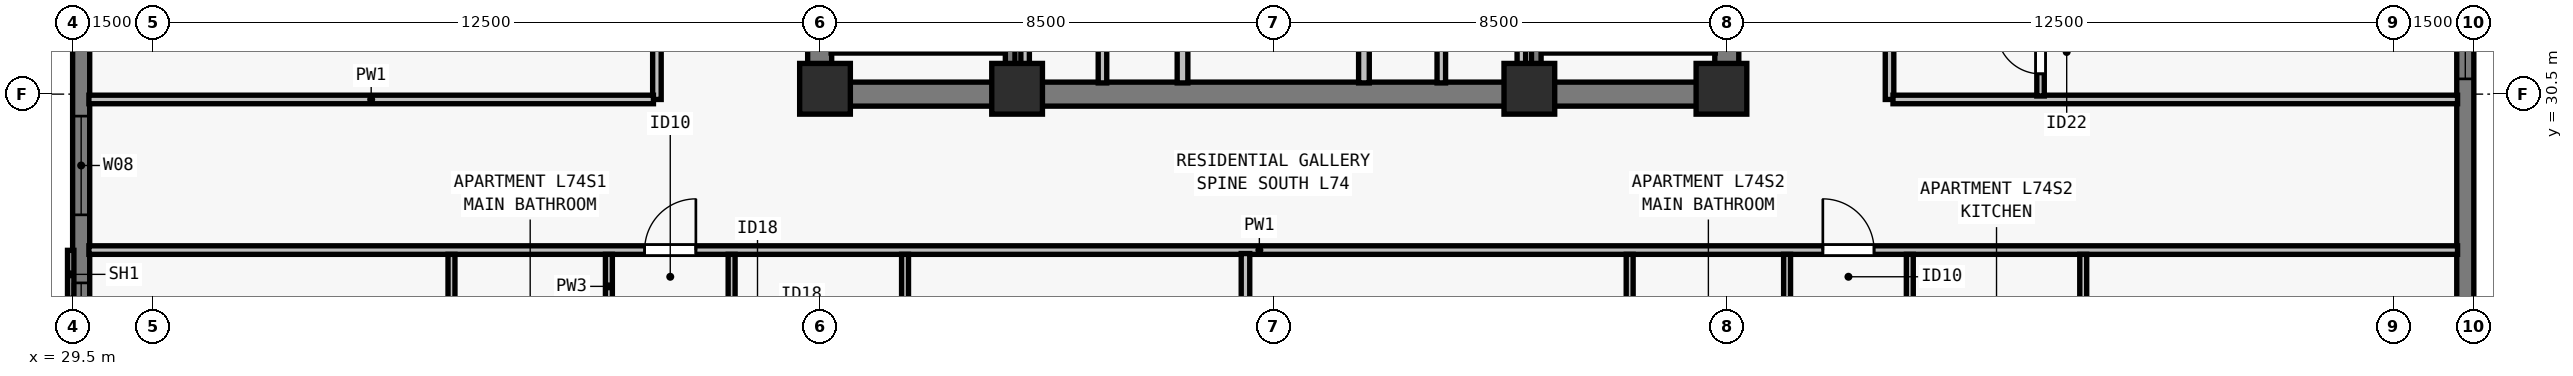
"""IFC4 building model, lengths in metres.
Left out: names, types, materials, properties, quantities, classifications, styles, units other than length and angle.
Written with IfcOpenShell. Run it as: python <this file> out.ifc"""

import sys

from ifc_helpers import new_model, si_unit, direction, frame, frame_2d, origin, origin_2d, place, context, subcontext, project, spatial, rectangle, extrude, element, fill, save


model = new_model("IFC4")
c1 = context("Model", 3, precision=1e-05, world=origin(), true_north=direction((0.0, 1.0)))
c2 = subcontext(c1, "Body", "Model", "MODEL_VIEW")
j1 = project(units=[si_unit("LENGTHUNIT", "METRE"), si_unit("PLANEANGLEUNIT", "RADIAN")], contexts=[c1])
p1 = place(None, origin())
s1 = spatial("IfcSite", under=j1, at=p1, CompositionType="ELEMENT")
p2 = place(p1, origin())
s2 = spatial("IfcBuilding", under=s1, at=p2, CompositionType="ELEMENT")
p3 = place(p2, frame((0.0, 0.0, 269.0)))
s3 = spatial("IfcBuildingStorey", under=s2, at=p3, CompositionType="ELEMENT", Elevation=269.0)
for number, where, z_axis, x_axis in (
    (1, (43.6, 30.6, 0.0), (0.0, 0.0, 1.0), (1.0, 0.0, 0.0)),
    (2, (47.2, 30.6, 0.0), (0.0, 0.0, 1.0), (1.0, 0.0, 0.0)),
    (3, (56.8, 30.6, 0.0), (0.0, 0.0, 1.0), (1.0, 0.0, 0.0)),
    (4, (60.4, 30.6, 0.0), (0.0, 0.0, 1.0), (1.0, 0.0, 0.0)),
):
    element("IfcColumn", number, at=place(p3, frame(where, z_axis=z_axis, x_axis=x_axis)), inside=s3, PredefinedType="COLUMN", context=c2, shape_type="SweptSolid", body=[
        extrude(rectangle(XDim=0.95, YDim=0.95, at=origin_2d()), origin(), (0.0, 0.0, 1.0), 3.5),
    ])
p4 = place(p3, frame((29.66, 21.5, 0.0), z_axis=(0.0, 0.0, 1.0), x_axis=(0.0, 1.0, 0.0)))
e5 = element("IfcWall", 5, at=p4, inside=s3, PredefinedType="SOLIDWALL", context=c2, shape_type="SweptSolid", body=[
    extrude(rectangle(XDim=34.702, YDim=0.32, at=frame_2d((17.351, 0.0))), origin(), (0.0, 0.0, 1.0), 3.29),
])
p5 = place(p4, frame((3.913, 0.0, 0.8)))
e6 = element("IfcOpeningElement", 6, at=p5, cuts=e5, PredefinedType="OPENING", context=c2, shape_type="SweptSolid", body=[
    extrude(rectangle(XDim=1.55, YDim=1.678, at=frame_2d((0.775, 0.839))), frame((0.0, 0.17, 0.0), z_axis=(0.0, -1.0, 0.0), x_axis=(1.0, 0.0, 0.0)), (0.0, 0.0, 1.0), 0.34),
])
p6 = place(p4, frame((6.738, 0.0, 0.8)))
e7 = element("IfcOpeningElement", 7, at=p6, cuts=e5, PredefinedType="OPENING", context=c2, shape_type="SweptSolid", body=[
    extrude(rectangle(XDim=1.85, YDim=1.678, at=frame_2d((0.925, 0.839))), frame((0.0, 0.17, 0.0), z_axis=(0.0, -1.0, 0.0), x_axis=(1.0, 0.0, 0.0)), (0.0, 0.0, 1.0), 0.34),
])
p7 = place(p4, frame((10.263, 0.0, 0.8)))
e8 = element("IfcOpeningElement", 8, at=p7, cuts=e5, PredefinedType="OPENING", context=c2, shape_type="SweptSolid", body=[
    extrude(rectangle(XDim=1.55, YDim=1.678, at=frame_2d((0.775, 0.839))), frame((0.0, 0.17, 0.0), z_axis=(0.0, -1.0, 0.0), x_axis=(1.0, 0.0, 0.0)), (0.0, 0.0, 1.0), 0.34),
])
p8 = place(p4, frame((14.738, 0.0, 0.8)))
e9 = element("IfcOpeningElement", 9, at=p8, cuts=e5, PredefinedType="OPENING", context=c2, shape_type="SweptSolid", body=[
    extrude(rectangle(XDim=1.85, YDim=1.678, at=frame_2d((0.925, 0.839))), frame((0.0, 0.17, 0.0), z_axis=(0.0, -1.0, 0.0), x_axis=(1.0, 0.0, 0.0)), (0.0, 0.0, 1.0), 0.34),
])
p9 = place(p4, frame((18.264, 0.0, 0.8)))
e10 = element("IfcOpeningElement", 10, at=p9, cuts=e5, PredefinedType="OPENING", context=c2, shape_type="SweptSolid", body=[
    extrude(rectangle(XDim=1.55, YDim=1.678, at=frame_2d((0.775, 0.839))), frame((0.0, 0.17, 0.0), z_axis=(0.0, -1.0, 0.0), x_axis=(1.0, 0.0, 0.0)), (0.0, 0.0, 1.0), 0.34),
])
p10 = place(p4, frame((24.164, 0.0, 0.8)))
e11 = element("IfcOpeningElement", 11, at=p10, cuts=e5, PredefinedType="OPENING", context=c2, shape_type="SweptSolid", body=[
    extrude(rectangle(XDim=1.55, YDim=1.678, at=frame_2d((0.775, 0.839))), frame((0.0, 0.17, 0.0), z_axis=(0.0, -1.0, 0.0), x_axis=(1.0, 0.0, 0.0)), (0.0, 0.0, 1.0), 0.34),
])
p11 = place(p3, frame((74.34, 56.5, 0.0), z_axis=(0.0, 0.0, 1.0), x_axis=(0.0, -1.0, 0.0)))
e12 = element("IfcWall", 12, at=p11, inside=s3, PredefinedType="SOLIDWALL", context=c2, shape_type="SweptSolid", body=[
    extrude(rectangle(XDim=34.702, YDim=0.32, at=frame_2d((17.351, 0.0))), origin(), (0.0, 0.0, 1.0), 3.29),
])
p12 = place(p11, frame((6.738, 0.0, 0.8)))
e13 = element("IfcOpeningElement", 13, at=p12, cuts=e12, PredefinedType="OPENING", context=c2, shape_type="SweptSolid", body=[
    extrude(rectangle(XDim=1.85, YDim=1.678, at=frame_2d((0.925, 0.839))), frame((0.0, 0.17, 0.0), z_axis=(0.0, -1.0, 0.0), x_axis=(1.0, 0.0, 0.0)), (0.0, 0.0, 1.0), 0.34),
])
p13 = place(p11, frame((10.263, 0.0, 0.8)))
e14 = element("IfcOpeningElement", 14, at=p13, cuts=e12, PredefinedType="OPENING", context=c2, shape_type="SweptSolid", body=[
    extrude(rectangle(XDim=1.55, YDim=1.678, at=frame_2d((0.775, 0.839))), frame((0.0, 0.17, 0.0), z_axis=(0.0, -1.0, 0.0), x_axis=(1.0, 0.0, 0.0)), (0.0, 0.0, 1.0), 0.34),
])
p14 = place(p11, frame((13.488, 0.0, 0.8)))
e15 = element("IfcOpeningElement", 15, at=p14, cuts=e12, PredefinedType="OPENING", context=c2, shape_type="SweptSolid", body=[
    extrude(rectangle(XDim=1.85, YDim=1.678, at=frame_2d((0.925, 0.839))), frame((0.0, 0.17, 0.0), z_axis=(0.0, -1.0, 0.0), x_axis=(1.0, 0.0, 0.0)), (0.0, 0.0, 1.0), 0.34),
])
p15 = place(p11, frame((18.264, 0.0, 0.8)))
e16 = element("IfcOpeningElement", 16, at=p15, cuts=e12, PredefinedType="OPENING", context=c2, shape_type="SweptSolid", body=[
    extrude(rectangle(XDim=1.55, YDim=1.678, at=frame_2d((0.775, 0.839))), frame((0.0, 0.17, 0.0), z_axis=(0.0, -1.0, 0.0), x_axis=(1.0, 0.0, 0.0)), (0.0, 0.0, 1.0), 0.34),
])
p16 = place(p11, frame((24.164, 0.0, 0.8)))
e17 = element("IfcOpeningElement", 17, at=p16, cuts=e12, PredefinedType="OPENING", context=c2, shape_type="SweptSolid", body=[
    extrude(rectangle(XDim=1.55, YDim=1.678, at=frame_2d((0.775, 0.839))), frame((0.0, 0.17, 0.0), z_axis=(0.0, -1.0, 0.0), x_axis=(1.0, 0.0, 0.0)), (0.0, 0.0, 1.0), 0.34),
])
p17 = place(p3, frame((43.275, 30.5, 0.0), z_axis=(0.0, 0.0, 1.0), x_axis=(1.0, 0.0, 0.0)))
e18 = element("IfcWall", 18, at=p17, inside=s3, PredefinedType="SHEAR", context=c2, shape_type="SweptSolid", body=[
    extrude(rectangle(XDim=17.45, YDim=0.45, at=frame_2d((8.725, 0.0))), origin(), (0.0, 0.0, 1.0), 3.29),
])
for number, where, z_axis, x_axis in (
    (19, (43.5, 30.715, 0.0), (0.0, 0.0, 1.0), (0.0, 1.0, 0.0)),
    (20, (60.5, 30.715, 0.0), (0.0, 0.0, 1.0), (0.0, 1.0, 0.0)),
):
    element("IfcWall", number, at=place(p3, frame(where, z_axis=z_axis, x_axis=x_axis)), inside=s3, PredefinedType="SHEAR", context=c2, shape_type="SweptSolid", body=[
        extrude(rectangle(XDim=8.035, YDim=0.45, at=frame_2d((4.018, 0.0))), origin(), (0.0, 0.0, 1.0), 3.29),
    ])
p18 = place(p3, frame((50.3, 30.71, 0.0), z_axis=(0.0, 0.0, 1.0), x_axis=(0.0, 1.0, 0.0)))
e21 = element("IfcWall", 21, at=p18, inside=s3, PredefinedType="SOLIDWALL", context=c2, shape_type="SweptSolid", body=[
    extrude(rectangle(XDim=7.905, YDim=0.2, at=frame_2d((3.953, 0.0))), origin(), (0.0, 0.0, 1.0), 3.29),
])
p19 = place(p18, frame((2.14, 0.0, 0.0)))
e22 = element("IfcOpeningElement", 22, at=p19, cuts=e21, PredefinedType="OPENING", context=c2, shape_type="SweptSolid", body=[
    extrude(rectangle(XDim=0.95, YDim=2.12, at=frame_2d((0.475, 1.06))), frame((0.0, 0.11, 0.0), z_axis=(0.0, -1.0, 0.0), x_axis=(1.0, 0.0, 0.0)), (0.0, 0.0, 1.0), 0.22),
])
p20 = place(p3, frame((53.7, 30.71, 0.0), z_axis=(0.0, 0.0, 1.0), x_axis=(0.0, 1.0, 0.0)))
e23 = element("IfcWall", 23, at=p20, inside=s3, PredefinedType="SOLIDWALL", context=c2, shape_type="SweptSolid", body=[
    extrude(rectangle(XDim=7.905, YDim=0.2, at=frame_2d((3.953, 0.0))), origin(), (0.0, 0.0, 1.0), 3.29),
])
p21 = place(p20, frame((2.14, 0.0, 0.0)))
e24 = element("IfcOpeningElement", 24, at=p21, cuts=e23, PredefinedType="OPENING", context=c2, shape_type="SweptSolid", body=[
    extrude(rectangle(XDim=0.95, YDim=2.12, at=frame_2d((0.475, 1.06))), frame((0.0, 0.11, 0.0), z_axis=(0.0, -1.0, 0.0), x_axis=(1.0, 0.0, 0.0)), (0.0, 0.0, 1.0), 0.22),
])
p22 = place(p3, frame((47.35, 30.71, 0.0), z_axis=(0.0, 0.0, 1.0), x_axis=(0.0, 1.0, 0.0)))
e25 = element("IfcWall", 25, at=p22, inside=s3, PredefinedType="PARTITIONING", context=c2, shape_type="SweptSolid", body=[
    extrude(rectangle(XDim=7.905, YDim=0.16, at=frame_2d((3.953, 0.0))), origin(), (0.0, 0.0, 1.0), 3.29),
])
p23 = place(p3, frame((48.8, 30.71, 0.0), z_axis=(0.0, 0.0, 1.0), x_axis=(0.0, 1.0, 0.0)))
e26 = element("IfcWall", 26, at=p23, inside=s3, PredefinedType="PARTITIONING", context=c2, shape_type="SweptSolid", body=[
    extrude(rectangle(XDim=7.905, YDim=0.16, at=frame_2d((3.953, 0.0))), origin(), (0.0, 0.0, 1.0), 3.29),
])
p24 = place(p23, frame((3.54, 0.0, 0.0)))
e27 = element("IfcOpeningElement", 27, at=p24, cuts=e26, PredefinedType="OPENING", context=c2, shape_type="SweptSolid", body=[
    extrude(rectangle(XDim=0.85, YDim=2.12, at=frame_2d((0.425, 1.06))), frame((0.0, 0.09, 0.0), z_axis=(0.0, -1.0, 0.0), x_axis=(1.0, 0.0, 0.0)), (0.0, 0.0, 1.0), 0.18),
])
p25 = place(p3, frame((56.65, 30.71, 0.0), z_axis=(0.0, 0.0, 1.0), x_axis=(0.0, 1.0, 0.0)))
e28 = element("IfcWall", 28, at=p25, inside=s3, PredefinedType="PARTITIONING", context=c2, shape_type="SweptSolid", body=[
    extrude(rectangle(XDim=7.905, YDim=0.16, at=frame_2d((3.953, 0.0))), origin(), (0.0, 0.0, 1.0), 3.29),
])
p26 = place(p3, frame((55.15, 30.71, 0.0), z_axis=(0.0, 0.0, 1.0), x_axis=(0.0, 1.0, 0.0)))
e29 = element("IfcWall", 29, at=p26, inside=s3, PredefinedType="PARTITIONING", context=c2, shape_type="SweptSolid", body=[
    extrude(rectangle(XDim=7.905, YDim=0.16, at=frame_2d((3.953, 0.0))), origin(), (0.0, 0.0, 1.0), 3.29),
])
p27 = place(p26, frame((3.54, 0.0, 0.0)))
e30 = element("IfcOpeningElement", 30, at=p27, cuts=e29, PredefinedType="OPENING", context=c2, shape_type="SweptSolid", body=[
    extrude(rectangle(XDim=0.85, YDim=2.12, at=frame_2d((0.425, 1.06))), frame((0.0, 0.09, 0.0), z_axis=(0.0, -1.0, 0.0), x_axis=(1.0, 0.0, 0.0)), (0.0, 0.0, 1.0), 0.18),
])
p28 = place(p3, frame((29.805, 27.577, 0.0), z_axis=(0.0, 0.0, 1.0), x_axis=(1.0, 0.0, 0.0)))
e31 = element("IfcWall", 31, at=p28, inside=s3, PredefinedType="PARTITIONING", context=c2, shape_type="SweptSolid", body=[
    extrude(rectangle(XDim=44.39, YDim=0.16, at=frame_2d((22.195, 0.0))), origin(), (0.0, 0.0, 1.0), 2.958),
])
p29 = place(p28, frame((10.415, 0.0, 0.0)))
e32 = element("IfcOpeningElement", 32, at=p29, cuts=e31, PredefinedType="OPENING", context=c2, shape_type="SweptSolid", body=[
    extrude(rectangle(XDim=0.96, YDim=2.18, at=frame_2d((0.48, 1.09))), frame((0.0, 0.09, 0.0), z_axis=(0.0, -1.0, 0.0), x_axis=(1.0, 0.0, 0.0)), (0.0, 0.0, 1.0), 0.18),
])
p30 = place(p28, frame((32.495, 0.0, 0.0)))
e33 = element("IfcOpeningElement", 33, at=p30, cuts=e31, PredefinedType="OPENING", context=c2, shape_type="SweptSolid", body=[
    extrude(rectangle(XDim=0.96, YDim=2.18, at=frame_2d((0.48, 1.09))), frame((0.0, 0.09, 0.0), z_axis=(0.0, -1.0, 0.0), x_axis=(1.0, 0.0, 0.0)), (0.0, 0.0, 1.0), 0.18),
])
p31 = place(p3, frame((40.45, 30.4, 0.0), z_axis=(0.0, 0.0, 1.0), x_axis=(0.0, 1.0, 0.0)))
e34 = element("IfcWall", 34, at=p31, inside=s3, PredefinedType="PARTITIONING", context=c2, shape_type="SweptSolid", body=[
    extrude(rectangle(XDim=17.2, YDim=0.16, at=frame_2d((8.6, 0.0))), origin(), (0.0, 0.0, 1.0), 3.29),
])
p32 = place(p31, frame((3.6, 0.0, 0.0)))
e35 = element("IfcOpeningElement", 35, at=p32, cuts=e34, PredefinedType="OPENING", context=c2, shape_type="SweptSolid", body=[
    extrude(rectangle(XDim=0.96, YDim=2.12, at=frame_2d((0.48, 1.06))), frame((0.0, 0.09, 0.0), z_axis=(0.0, -1.0, 0.0), x_axis=(1.0, 0.0, 0.0)), (0.0, 0.0, 1.0), 0.18),
])
p33 = place(p31, frame((12.44, 0.0, 0.0)))
e36 = element("IfcOpeningElement", 36, at=p33, cuts=e34, PredefinedType="OPENING", context=c2, shape_type="SweptSolid", body=[
    extrude(rectangle(XDim=0.96, YDim=2.18, at=frame_2d((0.48, 1.09))), frame((0.0, 0.09, 0.0), z_axis=(0.0, -1.0, 0.0), x_axis=(1.0, 0.0, 0.0)), (0.0, 0.0, 1.0), 0.18),
])
p34 = place(p3, frame((63.55, 30.4, 0.0), z_axis=(0.0, 0.0, 1.0), x_axis=(0.0, 1.0, 0.0)))
e37 = element("IfcWall", 37, at=p34, inside=s3, PredefinedType="PARTITIONING", context=c2, shape_type="SweptSolid", body=[
    extrude(rectangle(XDim=17.2, YDim=0.16, at=frame_2d((8.6, 0.0))), origin(), (0.0, 0.0, 1.0), 3.29),
])
p35 = place(p34, frame((8.12, 0.0, 0.0)))
e38 = element("IfcOpeningElement", 38, at=p35, cuts=e37, PredefinedType="OPENING", context=c2, shape_type="SweptSolid", body=[
    extrude(rectangle(XDim=0.96, YDim=2.18, at=frame_2d((0.48, 1.09))), frame((0.0, 0.09, 0.0), z_axis=(0.0, -1.0, 0.0), x_axis=(1.0, 0.0, 0.0)), (0.0, 0.0, 1.0), 0.18),
])
for number, where, z_axis, x_axis in (
    (39, (29.805, 30.4, 0.0), (0.0, 0.0, 1.0), (1.0, 0.0, 0.0)),
    (40, (63.615, 30.4, 0.0), (0.0, 0.0, 1.0), (1.0, 0.0, 0.0)),
):
    element("IfcWall", number, at=place(p3, frame(where, z_axis=z_axis, x_axis=x_axis)), inside=s3, PredefinedType="PARTITIONING", context=c2, shape_type="SweptSolid", body=[
        extrude(rectangle(XDim=10.58, YDim=0.16, at=frame_2d((5.29, 0.0))), origin(), (0.0, 0.0, 1.0), 3.29),
    ])
p36 = place(p3, frame((36.6, 24.748, 0.0), z_axis=(0.0, 0.0, 1.0), x_axis=(0.0, 1.0, 0.0)))
e41 = element("IfcWall", 41, at=p36, inside=s3, PredefinedType="PLUMBINGWALL", context=c2, shape_type="SweptSolid", body=[
    extrude(rectangle(XDim=2.75, YDim=0.13, at=frame_2d((1.375, 0.0))), origin(), (0.0, 0.0, 1.0), 3.29),
])
p37 = place(p3, frame((39.55, 24.748, 0.0), z_axis=(0.0, 0.0, 1.0), x_axis=(0.0, 1.0, 0.0)))
e42 = element("IfcWall", 42, at=p37, inside=s3, PredefinedType="PLUMBINGWALL", context=c2, shape_type="SweptSolid", body=[
    extrude(rectangle(XDim=2.75, YDim=0.13, at=frame_2d((1.375, 0.0))), origin(), (0.0, 0.0, 1.0), 3.29),
])
p38 = place(p37, frame((0.55, 0.0, 0.0)))
e43 = element("IfcOpeningElement", 43, at=p38, cuts=e42, PredefinedType="OPENING", context=c2, shape_type="SweptSolid", body=[
    extrude(rectangle(XDim=0.85, YDim=2.08, at=frame_2d((0.425, 1.04))), frame((0.0, 0.075, 0.0), z_axis=(0.0, -1.0, 0.0), x_axis=(1.0, 0.0, 0.0)), (0.0, 0.0, 1.0), 0.15),
])
p39 = place(p3, frame((45.1, 24.748, 0.0), z_axis=(0.0, 0.0, 1.0), x_axis=(0.0, 1.0, 0.0)))
e44 = element("IfcWall", 44, at=p39, inside=s3, PredefinedType="PLUMBINGWALL", context=c2, shape_type="SweptSolid", body=[
    extrude(rectangle(XDim=2.75, YDim=0.13, at=frame_2d((1.375, 0.0))), origin(), (0.0, 0.0, 1.0), 3.29),
])
p40 = place(p3, frame((41.85, 24.748, 0.0), z_axis=(0.0, 0.0, 1.0), x_axis=(0.0, 1.0, 0.0)))
e45 = element("IfcWall", 45, at=p40, inside=s3, PredefinedType="PLUMBINGWALL", context=c2, shape_type="SweptSolid", body=[
    extrude(rectangle(XDim=2.75, YDim=0.13, at=frame_2d((1.375, 0.0))), origin(), (0.0, 0.0, 1.0), 3.29),
])
p41 = place(p40, frame((0.55, 0.0, 0.0)))
e46 = element("IfcOpeningElement", 46, at=p41, cuts=e45, PredefinedType="OPENING", context=c2, shape_type="SweptSolid", body=[
    extrude(rectangle(XDim=0.88, YDim=2.1, at=frame_2d((0.44, 1.05))), frame((0.0, 0.075, 0.0), z_axis=(0.0, -1.0, 0.0), x_axis=(1.0, 0.0, 0.0)), (0.0, 0.0, 1.0), 0.15),
])
p42 = place(p3, frame((51.48, 16.77, 0.0), z_axis=(0.0, 0.0, 1.0), x_axis=(0.0, 1.0, 0.0)))
e47 = element("IfcWall", 47, at=p42, inside=s3, PredefinedType="PARTITIONING", context=c2, shape_type="SweptSolid", body=[
    extrude(rectangle(XDim=10.742, YDim=0.16, at=frame_2d((5.371, 0.0))), origin(), (0.0, 0.0, 1.0), 2.958),
])
p43 = place(p3, frame((58.68, 24.748, 0.0), z_axis=(0.0, 0.0, 1.0), x_axis=(0.0, 1.0, 0.0)))
e48 = element("IfcWall", 48, at=p43, inside=s3, PredefinedType="PLUMBINGWALL", context=c2, shape_type="SweptSolid", body=[
    extrude(rectangle(XDim=2.75, YDim=0.13, at=frame_2d((1.375, 0.0))), origin(), (0.0, 0.0, 1.0), 3.29),
])
p44 = place(p3, frame((61.63, 24.748, 0.0), z_axis=(0.0, 0.0, 1.0), x_axis=(0.0, 1.0, 0.0)))
e49 = element("IfcWall", 49, at=p44, inside=s3, PredefinedType="PLUMBINGWALL", context=c2, shape_type="SweptSolid", body=[
    extrude(rectangle(XDim=2.75, YDim=0.13, at=frame_2d((1.375, 0.0))), origin(), (0.0, 0.0, 1.0), 3.29),
])
p45 = place(p44, frame((0.55, 0.0, 0.0)))
e50 = element("IfcOpeningElement", 50, at=p45, cuts=e49, PredefinedType="OPENING", context=c2, shape_type="SweptSolid", body=[
    extrude(rectangle(XDim=0.85, YDim=2.08, at=frame_2d((0.425, 1.04))), frame((0.0, 0.075, 0.0), z_axis=(0.0, -1.0, 0.0), x_axis=(1.0, 0.0, 0.0)), (0.0, 0.0, 1.0), 0.15),
])
p46 = place(p3, frame((67.18, 24.748, 0.0), z_axis=(0.0, 0.0, 1.0), x_axis=(0.0, 1.0, 0.0)))
e51 = element("IfcWall", 51, at=p46, inside=s3, PredefinedType="PLUMBINGWALL", context=c2, shape_type="SweptSolid", body=[
    extrude(rectangle(XDim=2.75, YDim=0.13, at=frame_2d((1.375, 0.0))), origin(), (0.0, 0.0, 1.0), 3.29),
])
p47 = place(p3, frame((63.93, 24.748, 0.0), z_axis=(0.0, 0.0, 1.0), x_axis=(0.0, 1.0, 0.0)))
e52 = element("IfcWall", 52, at=p47, inside=s3, PredefinedType="PLUMBINGWALL", context=c2, shape_type="SweptSolid", body=[
    extrude(rectangle(XDim=2.75, YDim=0.13, at=frame_2d((1.375, 0.0))), origin(), (0.0, 0.0, 1.0), 2.573),
])
p48 = place(p47, frame((0.55, 0.0, 0.0)))
e53 = element("IfcOpeningElement", 53, at=p48, cuts=e52, PredefinedType="OPENING", context=c2, shape_type="SweptSolid", body=[
    extrude(rectangle(XDim=0.88, YDim=2.1, at=frame_2d((0.44, 1.05))), frame((0.0, 0.075, 0.0), z_axis=(0.0, -1.0, 0.0), x_axis=(1.0, 0.0, 0.0)), (0.0, 0.0, 1.0), 0.15),
])
p49 = place(p3, frame((66.38, 30.465, 0.0), z_axis=(0.0, 0.0, 1.0), x_axis=(0.0, 1.0, 0.0)))
e54 = element("IfcWall", 54, at=p49, inside=s3, PredefinedType="PARTITIONING", context=c2, shape_type="SweptSolid", body=[
    extrude(rectangle(XDim=4.16, YDim=0.14, at=frame_2d((2.08, 0.0))), origin(), (0.0, 0.0, 1.0), 3.29),
])
p50 = place(p49, frame((0.415, 0.0, 0.0)))
e55 = element("IfcOpeningElement", 55, at=p50, cuts=e54, PredefinedType="OPENING", context=c2, shape_type="SweptSolid", body=[
    extrude(rectangle(XDim=0.82, YDim=2.1, at=frame_2d((0.41, 1.05))), frame((0.0, 0.08, 0.0), z_axis=(0.0, -1.0, 0.0), x_axis=(1.0, 0.0, 0.0)), (0.0, 0.0, 1.0), 0.16),
])
p51 = place(p3, frame((43.715, 31.36, 0.0), z_axis=(0.0, 0.0, 1.0), x_axis=(1.0, 0.0, 0.0)))
e56 = element("IfcWall", 56, at=p51, inside=s3, PredefinedType="SOLIDWALL", context=c2, shape_type="SweptSolid", body=[
    extrude(rectangle(XDim=3.28, YDim=0.18, at=frame_2d((1.64, 0.0))), origin(), (0.0, 0.0, 1.0), 3.29),
])
p52 = place(p3, frame((47.07, 38.78, 0.0), z_axis=(0.0, 0.0, 1.0), x_axis=(0.0, -1.0, 0.0)))
e57 = element("IfcWall", 57, at=p52, inside=s3, PredefinedType="SOLIDWALL", context=c2, shape_type="SweptSolid", body=[
    extrude(rectangle(XDim=8.067, YDim=0.18, at=frame_2d((4.034, 0.0))), origin(), (0.0, 0.0, 1.0), 3.29),
])
p53 = place(p3, frame((57.005, 31.36, 0.0), z_axis=(0.0, 0.0, 1.0), x_axis=(1.0, 0.0, 0.0)))
e58 = element("IfcWall", 58, at=p53, inside=s3, PredefinedType="SOLIDWALL", context=c2, shape_type="SweptSolid", body=[
    extrude(rectangle(XDim=3.28, YDim=0.18, at=frame_2d((1.64, 0.0))), origin(), (0.0, 0.0, 1.0), 3.29),
])
p54 = place(p3, frame((56.93, 38.78, 0.0), z_axis=(0.0, 0.0, 1.0), x_axis=(0.0, -1.0, 0.0)))
e59 = element("IfcWall", 59, at=p54, inside=s3, PredefinedType="SOLIDWALL", context=c2, shape_type="SweptSolid", body=[
    extrude(rectangle(XDim=8.067, YDim=0.18, at=frame_2d((4.034, 0.0))), origin(), (0.0, 0.0, 1.0), 3.29),
])
p55 = place(p5, origin())
e60 = element("IfcWindow", 60, at=p55, inside=s3, PartitioningType="SINGLE_PANEL", PredefinedType="WINDOW", context=c2, shape_type="SweptSolid", body=[
    extrude(rectangle(XDim=1.55, YDim=1.678, at=frame_2d((0.775, 0.839))), frame((0.0, -0.05, 0.0), z_axis=(0.0, -1.0, 0.0), x_axis=(1.0, 0.0, 0.0)), (0.0, 0.0, 1.0), 0.06),
])
fill(e6, e60)
p56 = place(p6, origin())
e61 = element("IfcWindow", 61, at=p56, inside=s3, PartitioningType="SINGLE_PANEL", PredefinedType="WINDOW", context=c2, shape_type="SweptSolid", body=[
    extrude(rectangle(XDim=1.85, YDim=1.678, at=frame_2d((0.925, 0.839))), frame((0.0, -0.05, 0.0), z_axis=(0.0, -1.0, 0.0), x_axis=(1.0, 0.0, 0.0)), (0.0, 0.0, 1.0), 0.06),
])
fill(e7, e61)
p57 = place(p16, origin())
e62 = element("IfcWindow", 62, at=p57, inside=s3, PartitioningType="SINGLE_PANEL", PredefinedType="WINDOW", context=c2, shape_type="SweptSolid", body=[
    extrude(rectangle(XDim=1.55, YDim=1.678, at=frame_2d((0.775, 0.839))), frame((0.0, -0.05, 0.0), z_axis=(0.0, -1.0, 0.0), x_axis=(1.0, 0.0, 0.0)), (0.0, 0.0, 1.0), 0.06),
])
fill(e17, e62)
p58 = place(p29, origin())
e63 = element("IfcDoor", 63, at=p58, inside=s3, OperationType="SINGLE_SWING_RIGHT", PredefinedType="DOOR", context=c2, shape_type="SweptSolid", body=[
    extrude(rectangle(XDim=0.96, YDim=2.18, at=frame_2d((0.48, 1.09))), frame((0.0, 0.025, 0.0), z_axis=(0.0, -1.0, 0.0), x_axis=(1.0, 0.0, 0.0)), (0.0, 0.0, 1.0), 0.05),
])
fill(e32, e63)
p59 = place(p30, origin())
e64 = element("IfcDoor", 64, at=p59, inside=s3, OperationType="SINGLE_SWING_LEFT", PredefinedType="DOOR", context=c2, shape_type="SweptSolid", body=[
    extrude(rectangle(XDim=0.96, YDim=2.18, at=frame_2d((0.48, 1.09))), frame((0.0, 0.025, 0.0), z_axis=(0.0, -1.0, 0.0), x_axis=(1.0, 0.0, 0.0)), (0.0, 0.0, 1.0), 0.05),
])
fill(e33, e64)
p60 = place(p50, origin())
e65 = element("IfcDoor", 65, at=p60, inside=s3, OperationType="SINGLE_SWING_RIGHT", PredefinedType="DOOR", context=c2, shape_type="SweptSolid", body=[
    extrude(rectangle(XDim=0.82, YDim=2.1, at=frame_2d((0.41, 1.05))), frame((0.0, 0.025, 0.0), z_axis=(0.0, -1.0, 0.0), x_axis=(1.0, 0.0, 0.0)), (0.0, 0.0, 1.0), 0.05),
])
fill(e55, e65)
save(model, sys.argv[1])
